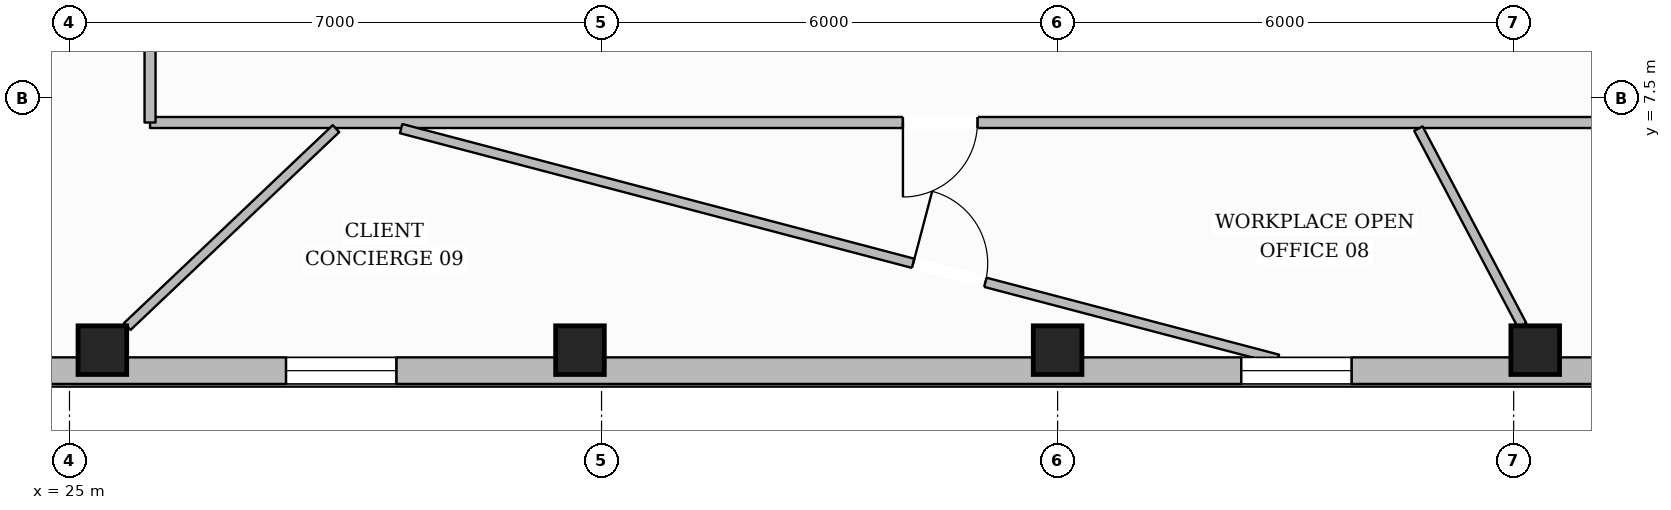
"""IFC4 building model, lengths in metres.
Left out: names, types, materials, properties, quantities, classifications, styles, units other than length and angle.
Written with IfcOpenShell. Run it as: python <this file> out.ifc"""

import sys

from ifc_helpers import new_model, si_unit, direction, frame, frame_2d, origin, origin_2d, place, context, subcontext, project, spatial, rectangle, hollow_rectangle, extrude, element, fill, save


model = new_model("IFC4")
c1 = context("Model", 3, precision=1e-05, world=origin(), true_north=direction((0.0, 1.0)))
c2 = subcontext(c1, "Body", "Model", "MODEL_VIEW")
j1 = project(units=[si_unit("LENGTHUNIT", "METRE"), si_unit("PLANEANGLEUNIT", "RADIAN")], contexts=[c1])
p1 = place(None, origin())
s1 = spatial("IfcSite", under=j1, at=p1, CompositionType="ELEMENT")
p2 = place(p1, origin())
s2 = spatial("IfcBuilding", under=s1, at=p2, CompositionType="ELEMENT")
p3 = place(p2, frame((0.0, 0.0, 203.5)))
s3 = spatial("IfcBuildingStorey", under=s2, at=p3, CompositionType="ELEMENT", Elevation=203.5)
for number, where, z_axis, x_axis in (
    (1, (25.433, 4.185, 0.0), (0.0, 0.0, 1.0), (1.0, 0.0, 0.0)),
    (2, (31.716, 4.185, 0.0), (0.0, 0.0, 1.0), (1.0, 0.0, 0.0)),
    (3, (38.0, 4.185, 0.0), (0.0, 0.0, 1.0), (1.0, 0.0, 0.0)),
    (4, (44.284, 4.185, 0.0), (0.0, 0.0, 1.0), (1.0, 0.0, 0.0)),
):
    element("IfcColumn", number, at=place(p3, frame(where, z_axis=z_axis, x_axis=x_axis)), inside=s3, PredefinedType="COLUMN", context=c2, shape_type="SweptSolid", body=[
        extrude(hollow_rectangle(XDim=0.64, YDim=0.64, WallThickness=0.028, at=origin_2d()), origin(), (0.0, 0.0, 1.0), 3.6),
    ])
p4 = place(p3, frame((57.325, 3.915, 0.0), z_axis=(0.0, 0.0, 1.0), x_axis=(-1.0, 0.0, 0.0)))
e5 = element("IfcWall", 5, at=p4, inside=s3, PredefinedType="STANDARD", context=c2, shape_type="SweptSolid", body=[
    extrude(rectangle(XDim=38.651, YDim=0.35, at=frame_2d((19.325, 0.0))), origin(), (0.0, 0.0, 1.0), 3.132),
])
p5 = place(p4, frame((34.31, 0.0, 0.65)))
e6 = element("IfcOpeningElement", 6, at=p5, cuts=e5, PredefinedType="OPENING", context=c2, shape_type="SweptSolid", body=[
    extrude(rectangle(XDim=1.45, YDim=1.75, at=frame_2d((0.725, 0.875))), frame((0.0, 0.185, 0.0), z_axis=(0.0, -1.0, 0.0), x_axis=(1.0, 0.0, 0.0)), (0.0, 0.0, 1.0), 0.37),
])
p6 = place(p4, frame((28.026, 0.0, 0.65)))
e7 = element("IfcOpeningElement", 7, at=p6, cuts=e5, PredefinedType="OPENING", context=c2, shape_type="SweptSolid", body=[
    extrude(rectangle(XDim=1.45, YDim=1.75, at=frame_2d((0.725, 0.875))), frame((0.0, 0.185, 0.0), z_axis=(0.0, -1.0, 0.0), x_axis=(1.0, 0.0, 0.0)), (0.0, 0.0, 1.0), 0.37),
])
p7 = place(p4, frame((15.458, 0.0, 0.65)))
e8 = element("IfcOpeningElement", 8, at=p7, cuts=e5, PredefinedType="OPENING", context=c2, shape_type="SweptSolid", body=[
    extrude(rectangle(XDim=1.45, YDim=1.75, at=frame_2d((0.725, 0.875))), frame((0.0, 0.185, 0.0), z_axis=(0.0, -1.0, 0.0), x_axis=(1.0, 0.0, 0.0)), (0.0, 0.0, 1.0), 0.37),
])
p8 = place(p4, frame((9.175, 0.0, 0.65)))
e9 = element("IfcOpeningElement", 9, at=p8, cuts=e5, PredefinedType="OPENING", context=c2, shape_type="SweptSolid", body=[
    extrude(rectangle(XDim=1.45, YDim=1.75, at=frame_2d((0.725, 0.875))), frame((0.0, 0.185, 0.0), z_axis=(0.0, -1.0, 0.0), x_axis=(1.0, 0.0, 0.0)), (0.0, 0.0, 1.0), 0.37),
])
p9 = place(p4, frame((2.891, 0.0, 0.65)))
e10 = element("IfcOpeningElement", 10, at=p9, cuts=e5, PredefinedType="OPENING", context=c2, shape_type="SweptSolid", body=[
    extrude(rectangle(XDim=1.45, YDim=1.75, at=frame_2d((0.725, 0.875))), frame((0.0, 0.185, 0.0), z_axis=(0.0, -1.0, 0.0), x_axis=(1.0, 0.0, 0.0)), (0.0, 0.0, 1.0), 0.37),
])
p10 = place(p3, frame((49.94, 7.18, 0.0), z_axis=(0.0, 0.0, 1.0), x_axis=(-1.0, 0.0, 0.0)))
e11 = element("IfcWall", 11, at=p10, inside=s3, PredefinedType="PARTITIONING", context=c2, shape_type="SweptSolid", body=[
    extrude(rectangle(XDim=23.88, YDim=0.145, at=frame_2d((11.94, 0.0))), origin(), (0.0, 0.0, 1.0), 3.6),
])
p11 = place(p10, frame((12.995, 0.0, 0.0)))
e12 = element("IfcOpeningElement", 12, at=p11, cuts=e11, PredefinedType="OPENING", context=c2, shape_type="SweptSolid", body=[
    extrude(rectangle(XDim=0.98, YDim=2.15, at=frame_2d((0.49, 1.075))), frame((0.0, 0.083, 0.0), z_axis=(0.0, -1.0, 0.0), x_axis=(1.0, 0.0, 0.0)), (0.0, 0.0, 1.0), 0.165),
])
p12 = place(p10, frame((2.991, 0.0, 0.0)))
e13 = element("IfcOpeningElement", 13, at=p12, cuts=e11, PredefinedType="OPENING", context=c2, shape_type="SweptSolid", body=[
    extrude(rectangle(XDim=0.98, YDim=2.15, at=frame_2d((0.49, 1.075))), frame((0.0, 0.083, 0.0), z_axis=(0.0, -1.0, 0.0), x_axis=(1.0, 0.0, 0.0)), (0.0, 0.0, 1.0), 0.165),
])
p13 = place(p3, frame((26.06, 7.18, 0.0), z_axis=(0.0, 0.0, 1.0), x_axis=(0.0, 1.0, 0.0)))
e14 = element("IfcWall", 14, at=p13, inside=s3, PredefinedType="PARTITIONING", context=c2, shape_type="SweptSolid", body=[
    extrude(rectangle(XDim=4.97, YDim=0.145, at=frame_2d((2.485, 0.0))), origin(), (0.0, 0.0, 1.0), 3.6),
])
p14 = place(p13, frame((1.785, 0.0, 0.0)))
e15 = element("IfcOpeningElement", 15, at=p14, cuts=e14, PredefinedType="OPENING", context=c2, shape_type="SweptSolid", body=[
    extrude(rectangle(XDim=1.4, YDim=2.2, at=frame_2d((0.7, 1.1))), frame((0.0, 0.083, 0.0), z_axis=(0.0, -1.0, 0.0), x_axis=(1.0, 0.0, 0.0)), (0.0, 0.0, 1.0), 0.165),
])
p15 = place(p3, frame((28.507, 7.1, 0.0), z_axis=(0.0, 0.0, 1.0), x_axis=(-0.725696611607, -0.688014845698, 0.0)))
e16 = element("IfcWall", 16, at=p15, inside=s3, PredefinedType="PARTITIONING", context=c2, shape_type="SweptSolid", body=[
    extrude(rectangle(XDim=3.784, YDim=0.125, at=frame_2d((1.892, 0.0))), origin(), (0.0, 0.0, 1.0), 3.6),
])
p16 = place(p3, frame((42.747, 7.1, 0.0), z_axis=(0.0, 0.0, 1.0), x_axis=(0.466479242613, -0.88453214538, 0.0)))
e17 = element("IfcWall", 17, at=p16, inside=s3, PredefinedType="PARTITIONING", context=c2, shape_type="SweptSolid", body=[
    extrude(rectangle(XDim=2.924, YDim=0.125, at=frame_2d((1.462, 0.0))), origin(), (0.0, 0.0, 1.0), 3.6),
])
p17 = place(p3, frame((29.363, 7.1, 0.0), z_axis=(0.0, 0.0, 1.0), x_axis=(0.967094155668, -0.254418737661, 0.0)))
e18 = element("IfcWall", 18, at=p17, inside=s3, PredefinedType="PARTITIONING", context=c2, shape_type="SweptSolid", body=[
    extrude(rectangle(XDim=11.927, YDim=0.125, at=frame_2d((5.963, 0.0))), origin(), (0.0, 0.0, 1.0), 3.135),
])
p18 = place(p17, frame((6.966, 0.0, 0.0)))
e19 = element("IfcOpeningElement", 19, at=p18, cuts=e18, PredefinedType="OPENING", context=c2, shape_type="SweptSolid", body=[
    extrude(rectangle(XDim=0.98, YDim=2.15, at=frame_2d((0.49, 1.075))), frame((0.0, 0.073, 0.0), z_axis=(0.0, -1.0, 0.0), x_axis=(1.0, 0.0, 0.0)), (0.0, 0.0, 1.0), 0.145),
])
p19 = place(p6, origin())
e20 = element("IfcWindow", 20, at=p19, inside=s3, PartitioningType="SINGLE_PANEL", PredefinedType="WINDOW", context=c2, shape_type="SweptSolid", body=[
    extrude(rectangle(XDim=1.45, YDim=1.75, at=frame_2d((0.725, 0.875))), frame((0.0, 0.03, 0.0), z_axis=(0.0, -1.0, 0.0), x_axis=(1.0, 0.0, 0.0)), (0.0, 0.0, 1.0), 0.06),
])
fill(e7, e20)
p20 = place(p7, origin())
e21 = element("IfcWindow", 21, at=p20, inside=s3, PartitioningType="SINGLE_PANEL", PredefinedType="WINDOW", context=c2, shape_type="SweptSolid", body=[
    extrude(rectangle(XDim=1.45, YDim=1.75, at=frame_2d((0.725, 0.875))), frame((0.0, 0.03, 0.0), z_axis=(0.0, -1.0, 0.0), x_axis=(1.0, 0.0, 0.0)), (0.0, 0.0, 1.0), 0.06),
])
fill(e8, e21)
p21 = place(p11, origin())
e22 = element("IfcDoor", 22, at=p21, inside=s3, OperationType="SINGLE_SWING_RIGHT", PredefinedType="DOOR", context=c2, shape_type="SweptSolid", body=[
    extrude(rectangle(XDim=0.98, YDim=2.15, at=frame_2d((0.49, 1.075))), frame((0.0, 0.025, 0.0), z_axis=(0.0, -1.0, 0.0), x_axis=(1.0, 0.0, 0.0)), (0.0, 0.0, 1.0), 0.05),
])
fill(e12, e22)
p22 = place(p18, origin())
e23 = element("IfcDoor", 23, at=p22, inside=s3, OperationType="SINGLE_SWING_LEFT", PredefinedType="DOOR", context=c2, shape_type="SweptSolid", body=[
    extrude(rectangle(XDim=0.98, YDim=2.15, at=frame_2d((0.49, 1.075))), frame((0.0, 0.025, 0.0), z_axis=(0.0, -1.0, 0.0), x_axis=(1.0, 0.0, 0.0)), (0.0, 0.0, 1.0), 0.05),
])
fill(e19, e23)
save(model, sys.argv[1])
